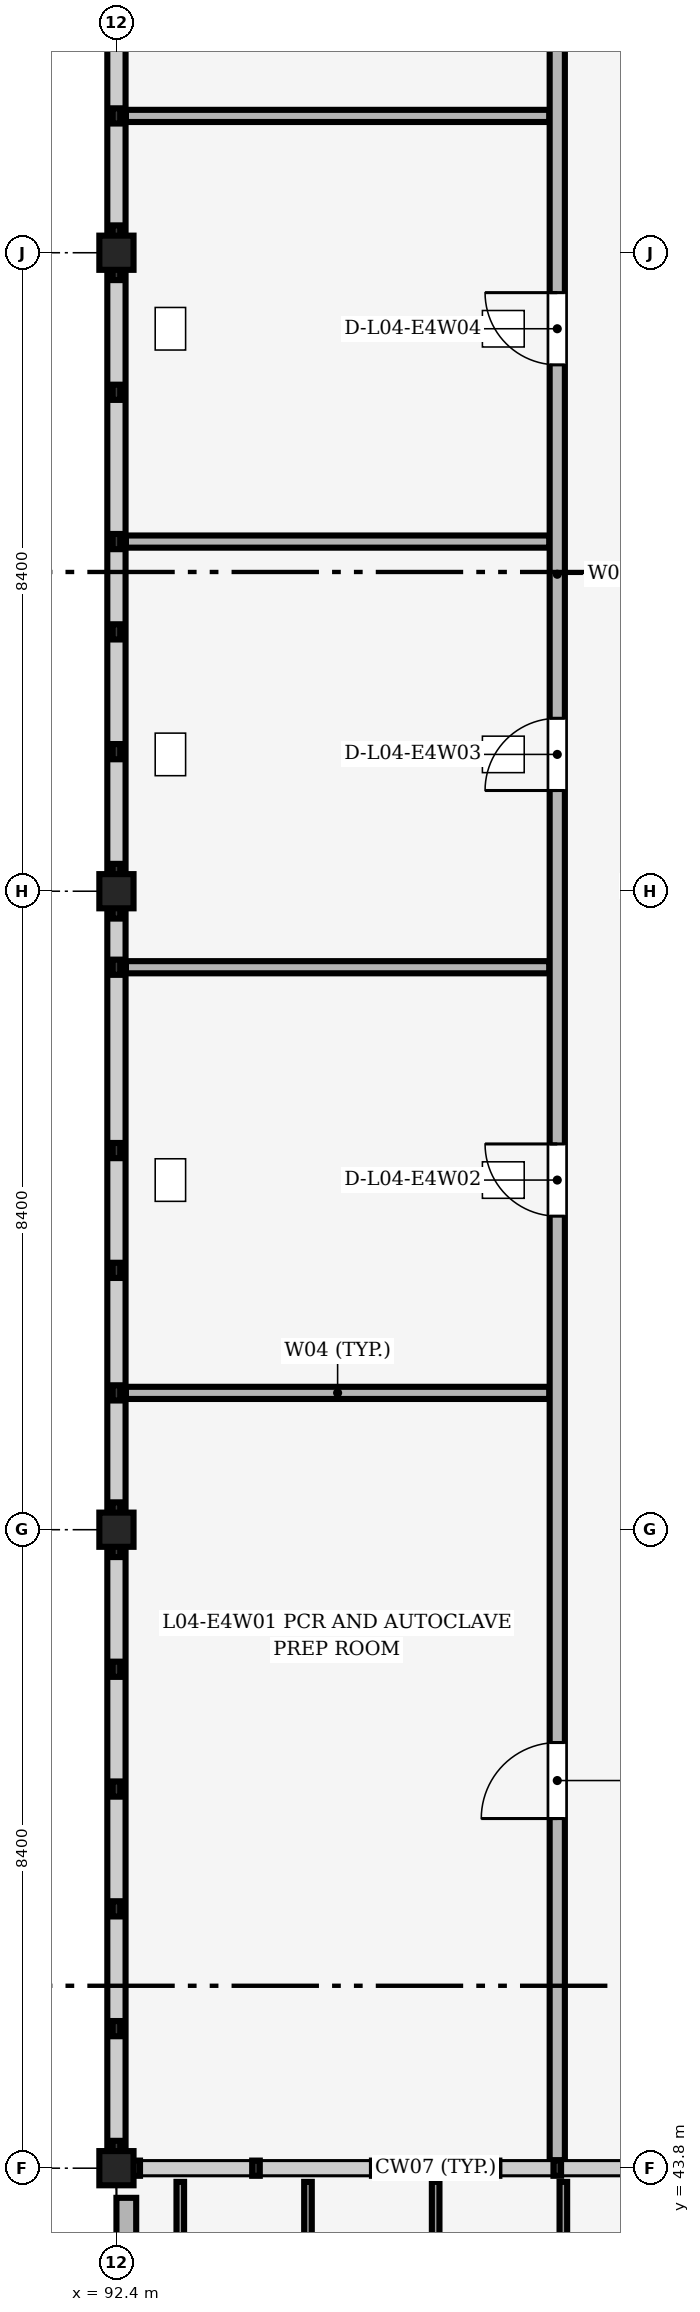
"""IFC4 building model, lengths in metres.
Left out: names, types, materials, properties, quantities, classifications, styles, units other than length and angle.
Written with IfcOpenShell. Run it as: python <this file> out.ifc"""

import sys

from ifc_helpers import new_model, si_unit, direction, frame, frame_2d, origin, origin_2d, place, context, subcontext, project, spatial, rectangle, extrude, element, fill, save


model = new_model("IFC4")
c1 = context("Model", 3, precision=1e-05, world=origin(), true_north=direction((0.0, 1.0)))
c2 = subcontext(c1, "Body", "Model", "MODEL_VIEW")
j1 = project(units=[si_unit("LENGTHUNIT", "METRE"), si_unit("PLANEANGLEUNIT", "RADIAN")], contexts=[c1])
p1 = place(None, origin())
s1 = spatial("IfcSite", under=j1, at=p1, CompositionType="ELEMENT")
p2 = place(p1, origin())
s2 = spatial("IfcBuilding", under=s1, at=p2, CompositionType="ELEMENT")
p3 = place(p2, frame((0.0, 0.0, 17.4)))
s3 = spatial("IfcBuildingStorey", under=s2, at=p3, CompositionType="ELEMENT", Elevation=17.4)
for number, where, z_axis, x_axis in (
    (1, (92.4, 43.8, 0.0), (0.0, 0.0, 1.0), (1.0, 0.0, 0.0)),
    (2, (92.4, 52.2, 0.0), (0.0, 0.0, 1.0), (1.0, 0.0, 0.0)),
    (3, (92.4, 60.6, 0.0), (0.0, 0.0, 1.0), (1.0, 0.0, 0.0)),
    (4, (92.4, 69.0, 0.0), (0.0, 0.0, 1.0), (1.0, 0.0, 0.0)),
):
    element("IfcColumn", number, at=place(p3, frame(where, z_axis=z_axis, x_axis=x_axis)), inside=s3, PredefinedType="COLUMN", context=c2, shape_type="SweptSolid", body=[
        extrude(rectangle(XDim=0.45, YDim=0.45, at=origin_2d()), origin(), (0.0, 0.0, 1.0), 4.2),
    ])
for number, where, z_axis, x_axis in (
    (5, (92.4, 44.0, 0.0), (0.0, 0.0, 1.0), (0.0, 1.0, 0.0)),
    (6, (92.4, 52.4, 0.0), (0.0, 0.0, 1.0), (0.0, 1.0, 0.0)),
    (7, (92.4, 60.8, 0.0), (0.0, 0.0, 1.0), (0.0, 1.0, 0.0)),
    (8, (92.4, 69.2, 0.0), (0.0, 0.0, 1.0), (0.0, 1.0, 0.0)),
):
    element("IfcWall", number, at=place(p3, frame(where, z_axis=z_axis, x_axis=x_axis)), inside=s3, PredefinedType="SOLIDWALL", context=c2, shape_type="SweptSolid", body=[
        extrude(rectangle(XDim=8.0, YDim=0.24, at=frame_2d((4.0, 0.0))), origin(), (0.0, 0.0, 1.0), 1.15),
    ])
p4 = place(p3, frame((92.53, 35.79, 0.0), z_axis=(0.0, 0.0, 1.0), x_axis=(0.0, 1.0, 0.0)))
e9 = element("IfcWall", 9, at=p4, inside=s3, PredefinedType="PARAPET", context=c2, shape_type="SweptSolid", body=[
    extrude(rectangle(XDim=7.62, YDim=0.26, at=frame_2d((3.81, 0.0))), origin(), (0.0, 0.0, 1.0), 0.85),
])
for number, where, z_axis, x_axis in (
    (10, (92.525, 54.0, 0.0), (0.0, 0.0, 1.0), (1.0, 0.0, 0.0)),
    (11, (92.525, 59.6, 0.0), (0.0, 0.0, 1.0), (1.0, 0.0, 0.0)),
    (12, (92.525, 65.2, 0.0), (0.0, 0.0, 1.0), (1.0, 0.0, 0.0)),
    (13, (92.525, 70.8, 0.0), (0.0, 0.0, 1.0), (1.0, 0.0, 0.0)),
):
    element("IfcWall", number, at=place(p3, frame(where, z_axis=z_axis, x_axis=x_axis)), inside=s3, PredefinedType="PARTITIONING", context=c2, shape_type="SweptSolid", body=[
        extrude(rectangle(XDim=5.57, YDim=0.16, at=frame_2d((2.785, 0.0))), origin(), (0.0, 0.0, 1.0), 3.9),
    ])
p5 = place(p3, frame((98.2, 43.905, 0.0), z_axis=(0.0, 0.0, 1.0), x_axis=(0.0, 1.0, 0.0)))
e14 = element("IfcWall", 14, at=p5, inside=s3, PredefinedType="PARTITIONING", context=c2, shape_type="SweptSolid", body=[
    extrude(rectangle(XDim=41.73, YDim=0.2, at=frame_2d((20.865, 0.0))), origin(), (0.0, 0.0, 1.0), 3.9),
])
p6 = place(p5, frame((4.495, 0.0, 0.0)))
e15 = element("IfcOpeningElement", 15, at=p6, cuts=e14, PredefinedType="OPENING", context=c2, shape_type="SweptSolid", body=[
    extrude(rectangle(XDim=1.0, YDim=2.15, at=frame_2d((0.5, 1.075))), frame((0.0, 0.11, 0.0), z_axis=(0.0, -1.0, 0.0), x_axis=(1.0, 0.0, 0.0)), (0.0, 0.0, 1.0), 0.22),
])
p7 = place(p5, frame((12.42, 0.0, 0.0)))
e16 = element("IfcOpeningElement", 16, at=p7, cuts=e14, PredefinedType="OPENING", context=c2, shape_type="SweptSolid", body=[
    extrude(rectangle(XDim=0.95, YDim=2.2, at=frame_2d((0.475, 1.1))), frame((0.0, 0.11, 0.0), z_axis=(0.0, -1.0, 0.0), x_axis=(1.0, 0.0, 0.0)), (0.0, 0.0, 1.0), 0.22),
])
p8 = place(p5, frame((18.02, 0.0, 0.0)))
e17 = element("IfcOpeningElement", 17, at=p8, cuts=e14, PredefinedType="OPENING", context=c2, shape_type="SweptSolid", body=[
    extrude(rectangle(XDim=0.95, YDim=2.2, at=frame_2d((0.475, 1.1))), frame((0.0, 0.11, 0.0), z_axis=(0.0, -1.0, 0.0), x_axis=(1.0, 0.0, 0.0)), (0.0, 0.0, 1.0), 0.22),
])
p9 = place(p5, frame((23.62, 0.0, 0.0)))
e18 = element("IfcOpeningElement", 18, at=p9, cuts=e14, PredefinedType="OPENING", context=c2, shape_type="SweptSolid", body=[
    extrude(rectangle(XDim=0.95, YDim=2.1, at=frame_2d((0.475, 1.05))), frame((0.0, 0.11, 0.0), z_axis=(0.0, -1.0, 0.0), x_axis=(1.0, 0.0, 0.0)), (0.0, 0.0, 1.0), 0.22),
])
p10 = place(p5, frame((33.895, 0.0, 0.0)))
e19 = element("IfcOpeningElement", 19, at=p10, cuts=e14, PredefinedType="OPENING", context=c2, shape_type="SweptSolid", body=[
    extrude(rectangle(XDim=1.0, YDim=2.15, at=frame_2d((0.5, 1.075))), frame((0.0, 0.11, 0.0), z_axis=(0.0, -1.0, 0.0), x_axis=(1.0, 0.0, 0.0)), (0.0, 0.0, 1.0), 0.22),
])
p11 = place(p6, origin())
e20 = element("IfcDoor", 20, at=p11, inside=s3, OperationType="SINGLE_SWING_LEFT", PredefinedType="DOOR", context=c2, shape_type="SweptSolid", body=[
    extrude(rectangle(XDim=1.0, YDim=2.15, at=frame_2d((0.5, 1.075))), frame((0.0, 0.025, 0.0), z_axis=(0.0, -1.0, 0.0), x_axis=(1.0, 0.0, 0.0)), (0.0, 0.0, 1.0), 0.05),
])
fill(e15, e20)
p12 = place(p7, origin())
e21 = element("IfcDoor", 21, at=p12, inside=s3, OperationType="SINGLE_SWING_RIGHT", PredefinedType="DOOR", context=c2, shape_type="SweptSolid", body=[
    extrude(rectangle(XDim=0.95, YDim=2.2, at=frame_2d((0.475, 1.1))), frame((0.0, 0.025, 0.0), z_axis=(0.0, -1.0, 0.0), x_axis=(1.0, 0.0, 0.0)), (0.0, 0.0, 1.0), 0.05),
])
fill(e16, e21)
p13 = place(p8, origin())
e22 = element("IfcDoor", 22, at=p13, inside=s3, OperationType="SINGLE_SWING_LEFT", PredefinedType="DOOR", context=c2, shape_type="SweptSolid", body=[
    extrude(rectangle(XDim=0.95, YDim=2.2, at=frame_2d((0.475, 1.1))), frame((0.0, 0.025, 0.0), z_axis=(0.0, -1.0, 0.0), x_axis=(1.0, 0.0, 0.0)), (0.0, 0.0, 1.0), 0.05),
])
fill(e17, e22)
p14 = place(p9, origin())
e23 = element("IfcDoor", 23, at=p14, inside=s3, OperationType="SINGLE_SWING_RIGHT", PredefinedType="DOOR", context=c2, shape_type="SweptSolid", body=[
    extrude(rectangle(XDim=0.95, YDim=2.1, at=frame_2d((0.475, 1.05))), frame((0.0, 0.025, 0.0), z_axis=(0.0, -1.0, 0.0), x_axis=(1.0, 0.0, 0.0)), (0.0, 0.0, 1.0), 0.05),
])
fill(e18, e23)
save(model, sys.argv[1])
